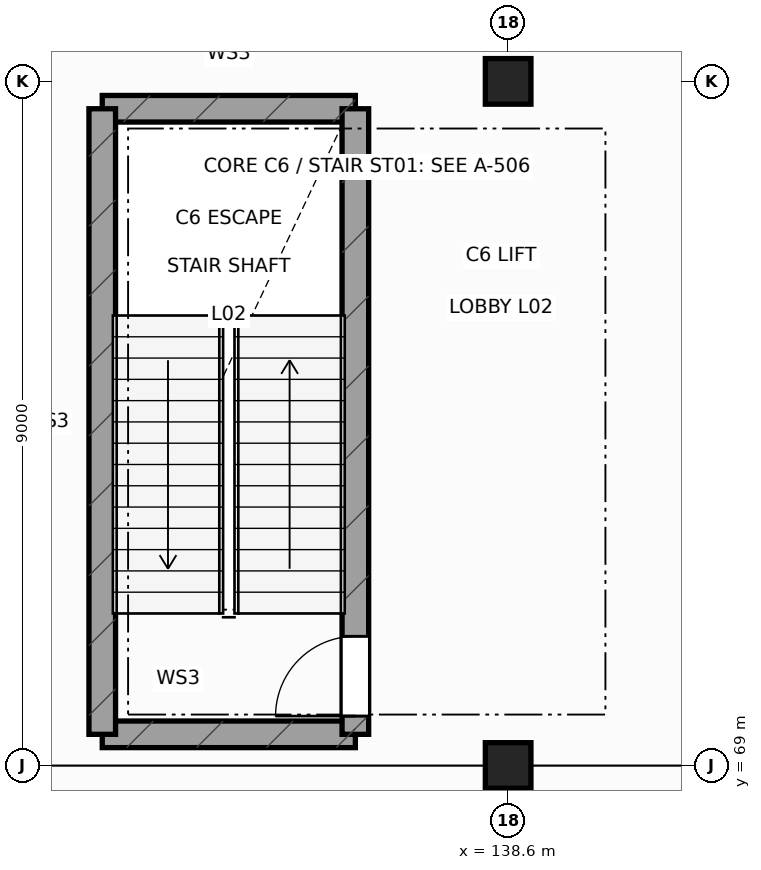
"""IFC4 building model, lengths in metres.
Left out: names, types, materials, properties, quantities, classifications, styles, units other than length and angle.
Written with IfcOpenShell. Run it as: python <this file> out.ifc"""

import sys

from ifc_helpers import new_model, si_unit, direction, frame, frame_2d, origin, origin_2d, place, context, subcontext, project, spatial, rectangle, extrude, element, fill, save


model = new_model("IFC4")
c1 = context("Model", 3, precision=1e-05, world=origin(), true_north=direction((0.0, 1.0)))
c2 = subcontext(c1, "Body", "Model", "MODEL_VIEW")
j1 = project(units=[si_unit("LENGTHUNIT", "METRE"), si_unit("PLANEANGLEUNIT", "RADIAN")], contexts=[c1])
p1 = place(None, origin())
s1 = spatial("IfcSite", under=j1, at=p1, CompositionType="ELEMENT")
p2 = place(p1, origin())
s2 = spatial("IfcBuilding", under=s1, at=p2, CompositionType="ELEMENT")
p3 = place(p2, frame((0.0, 0.0, 11.4)))
s3 = spatial("IfcBuildingStorey", under=s2, at=p3, CompositionType="ELEMENT", Elevation=11.4)
for number, where, z_axis, x_axis in (
    (1, (138.6, 69.0, 0.0), (0.0, 0.0, 1.0), (1.0, 0.0, 0.0)),
    (2, (138.6, 78.0, 0.0), (0.0, 0.0, 1.0), (1.0, 0.0, 0.0)),
):
    element("IfcColumn", number, at=place(p3, frame(where, z_axis=z_axis, x_axis=x_axis)), inside=s3, PredefinedType="COLUMN", context=c2, shape_type="SweptSolid", body=[
        extrude(rectangle(XDim=0.6, YDim=0.6, at=origin_2d()), origin(), (0.0, 0.0, 1.0), 5.4),
    ])
for number, where, z_axis, x_axis in (
    (3, (133.26, 69.41, 0.0), (0.0, 0.0, 1.0), (1.0, 0.0, 0.0)),
    (4, (133.26, 77.64, 0.0), (0.0, 0.0, 1.0), (1.0, 0.0, 0.0)),
):
    element("IfcWall", number, at=place(p3, frame(where, z_axis=z_axis, x_axis=x_axis)), inside=s3, PredefinedType="SHEAR", context=c2, shape_type="SweptSolid", body=[
        extrude(rectangle(XDim=3.33, YDim=0.35, at=frame_2d((1.665, 0.0))), origin(), (0.0, 0.0, 1.0), 5.12),
    ])
p4 = place(p3, frame((133.26, 69.41, 0.0), z_axis=(0.0, 0.0, 1.0), x_axis=(0.0, 1.0, 0.0)))
e5 = element("IfcWall", 5, at=p4, inside=s3, PredefinedType="SHEAR", context=c2, shape_type="SweptSolid", body=[
    extrude(rectangle(XDim=8.23, YDim=0.35, at=frame_2d((4.115, 0.0))), origin(), (0.0, 0.0, 1.0), 5.12),
])
p5 = place(p3, frame((136.59, 69.41, 0.0), z_axis=(0.0, 0.0, 1.0), x_axis=(0.0, 1.0, 0.0)))
e6 = element("IfcWall", 6, at=p5, inside=s3, PredefinedType="SHEAR", context=c2, shape_type="SweptSolid", body=[
    extrude(rectangle(XDim=8.23, YDim=0.35, at=frame_2d((4.115, 0.0))), origin(), (0.0, 0.0, 1.0), 5.12),
])
p6 = place(p5, frame((0.24, 0.0, 0.0)))
e7 = element("IfcOpeningElement", 7, at=p6, cuts=e6, PredefinedType="OPENING", context=c2, shape_type="SweptSolid", body=[
    extrude(rectangle(XDim=1.05, YDim=2.18, at=frame_2d((0.525, 1.09))), frame((0.0, 0.185, 0.0), z_axis=(0.0, -1.0, 0.0), x_axis=(1.0, 0.0, 0.0)), (0.0, 0.0, 1.0), 0.37),
])
p7 = place(p6, origin())
e8 = element("IfcDoor", 8, at=p7, inside=s3, OperationType="SINGLE_SWING_LEFT", PredefinedType="DOOR", context=c2, shape_type="SweptSolid", body=[
    extrude(rectangle(XDim=1.05, YDim=2.18, at=frame_2d((0.525, 1.09))), frame((0.0, 0.025, 0.0), z_axis=(0.0, -1.0, 0.0), x_axis=(1.0, 0.0, 0.0)), (0.0, 0.0, 1.0), 0.05),
])
fill(e7, e8)
save(model, sys.argv[1])
